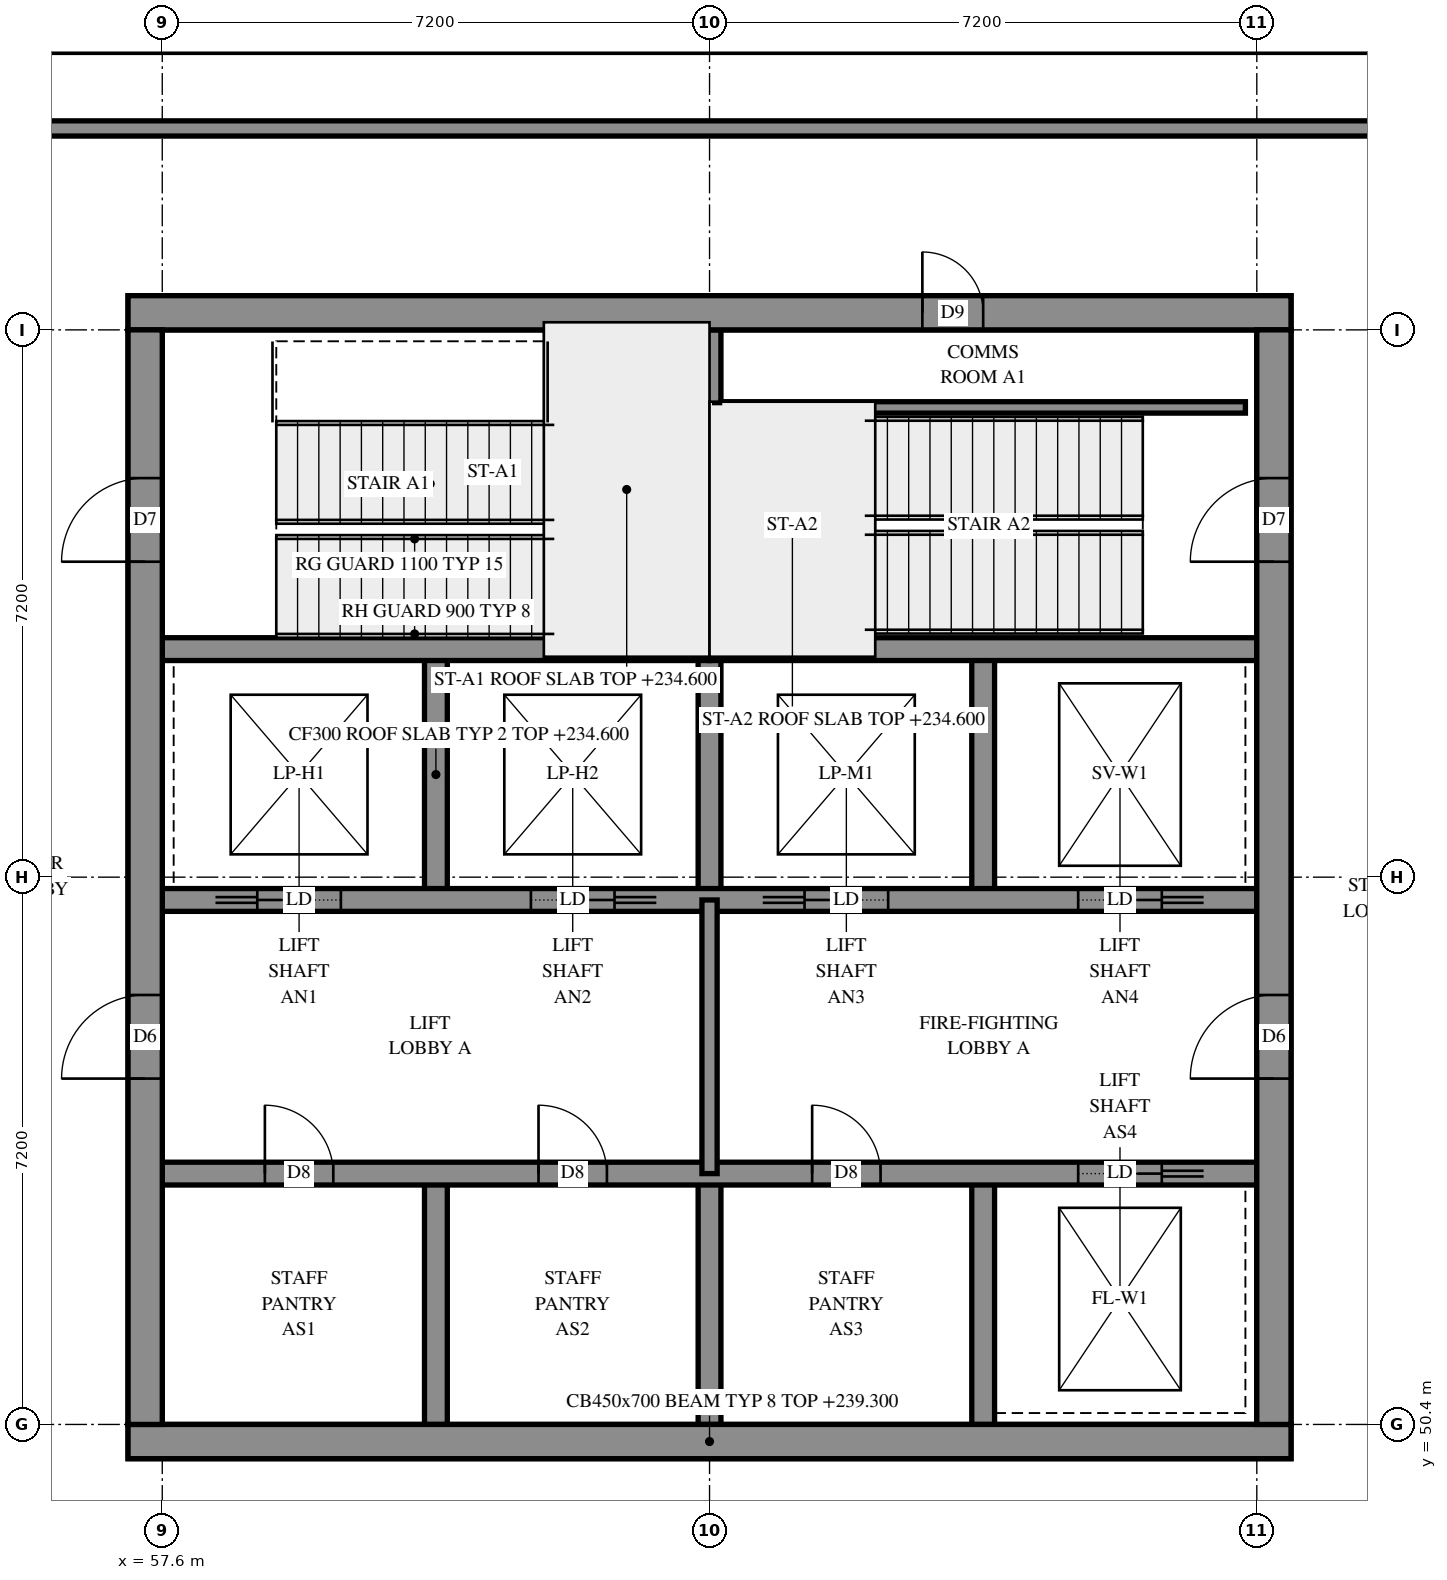
"""IFC4 building model, lengths in metres.
Left out: names, types, materials, properties, quantities, classifications, styles, units other than length and angle.
Written with IfcOpenShell. Run it as: python <this file> out.ifc"""

import sys

from ifc_helpers import new_model, si_unit, direction, frame, frame_2d, origin, place, context, subcontext, project, spatial, polyline, rectangle, outline, extrude, element, fill, save


model = new_model("IFC4")
c1 = context("Model", 3, precision=1e-05, world=origin(), true_north=direction((0.0, 1.0)))
c2 = subcontext(c1, "Body", "Model", "MODEL_VIEW")
j1 = project(units=[si_unit("LENGTHUNIT", "METRE"), si_unit("PLANEANGLEUNIT", "RADIAN")], contexts=[c1])
p1 = place(None, origin())
s1 = spatial("IfcSite", under=j1, at=p1, CompositionType="ELEMENT")
p2 = place(p1, origin())
s2 = spatial("IfcBuilding", under=s1, at=p2, CompositionType="ELEMENT")
p3 = place(p2, frame((0.0, 0.0, 234.6)))
s3 = spatial("IfcBuildingStorey", under=s2, at=p3, CompositionType="ELEMENT", Elevation=234.6)
p4 = place(p3, frame((57.15, 50.175, -0.3), z_axis=(0.0, 0.0, 1.0), x_axis=(1.0, 0.0, 0.0)))
e1 = element("IfcWall", 1, at=p4, inside=s3, PredefinedType="SHEAR", context=c2, shape_type="SweptSolid", body=[
    extrude(rectangle(XDim=15.3, YDim=0.45, at=frame_2d((7.65, 0.0))), origin(), (0.0, 0.0, 1.0), 4.3),
])
p5 = place(p3, frame((57.15, 65.025, -0.3), z_axis=(0.0, 0.0, 1.0), x_axis=(1.0, 0.0, 0.0)))
e2 = element("IfcWall", 2, at=p5, inside=s3, PredefinedType="SHEAR", context=c2, shape_type="SweptSolid", body=[
    extrude(rectangle(XDim=15.3, YDim=0.45, at=frame_2d((7.65, 0.0))), origin(), (0.0, 0.0, 1.0), 4.3),
])
p6 = place(p5, frame((10.45, 0.0, 0.3)))
e3 = element("IfcOpeningElement", 3, at=p6, cuts=e2, PredefinedType="OPENING", context=c2, shape_type="SweptSolid", body=[
    extrude(rectangle(XDim=0.8, YDim=2.1, at=frame_2d((0.4, 1.05))), frame((0.0, 0.235, 0.0), z_axis=(0.0, -1.0, 0.0), x_axis=(1.0, 0.0, 0.0)), (0.0, 0.0, 1.0), 0.47),
])
p7 = place(p3, frame((57.375, 50.4, -0.3), z_axis=(0.0, 0.0, 1.0), x_axis=(0.0, 1.0, 0.0)))
e4 = element("IfcWall", 4, at=p7, inside=s3, PredefinedType="SHEAR", context=c2, shape_type="SweptSolid", body=[
    extrude(rectangle(XDim=14.4, YDim=0.45, at=frame_2d((7.2, 0.0))), origin(), (0.0, 0.0, 1.0), 4.3),
])
p8 = place(p7, frame((4.55, 0.0, 0.3)))
e5 = element("IfcOpeningElement", 5, at=p8, cuts=e4, PredefinedType="OPENING", context=c2, shape_type="SweptSolid", body=[
    extrude(rectangle(XDim=1.1, YDim=2.1, at=frame_2d((0.55, 1.05))), frame((0.0, 0.235, 0.0), z_axis=(0.0, -1.0, 0.0), x_axis=(1.0, 0.0, 0.0)), (0.0, 0.0, 1.0), 0.47),
])
p9 = place(p7, frame((11.35, 0.0, 0.3)))
e6 = element("IfcOpeningElement", 6, at=p9, cuts=e4, PredefinedType="OPENING", context=c2, shape_type="SweptSolid", body=[
    extrude(rectangle(XDim=1.1, YDim=2.1, at=frame_2d((0.55, 1.05))), frame((0.0, 0.235, 0.0), z_axis=(0.0, -1.0, 0.0), x_axis=(1.0, 0.0, 0.0)), (0.0, 0.0, 1.0), 0.47),
])
p10 = place(p3, frame((72.225, 50.4, -0.3), z_axis=(0.0, 0.0, 1.0), x_axis=(0.0, 1.0, 0.0)))
e7 = element("IfcWall", 7, at=p10, inside=s3, PredefinedType="SHEAR", context=c2, shape_type="SweptSolid", body=[
    extrude(rectangle(XDim=14.4, YDim=0.45, at=frame_2d((7.2, 0.0))), origin(), (0.0, 0.0, 1.0), 4.3),
])
p11 = place(p10, frame((4.55, 0.0, 0.3)))
e8 = element("IfcOpeningElement", 8, at=p11, cuts=e7, PredefinedType="OPENING", context=c2, shape_type="SweptSolid", body=[
    extrude(rectangle(XDim=1.1, YDim=2.1, at=frame_2d((0.55, 1.05))), frame((0.0, 0.235, 0.0), z_axis=(0.0, -1.0, 0.0), x_axis=(1.0, 0.0, 0.0)), (0.0, 0.0, 1.0), 0.47),
])
p12 = place(p10, frame((11.35, 0.0, 0.3)))
e9 = element("IfcOpeningElement", 9, at=p12, cuts=e7, PredefinedType="OPENING", context=c2, shape_type="SweptSolid", body=[
    extrude(rectangle(XDim=1.1, YDim=2.1, at=frame_2d((0.55, 1.05))), frame((0.0, 0.235, 0.0), z_axis=(0.0, -1.0, 0.0), x_axis=(1.0, 0.0, 0.0)), (0.0, 0.0, 1.0), 0.47),
])
for number, where, z_axis, x_axis in (
    (10, (61.2, 50.4, 0.0), (0.0, 0.0, 1.0), (0.0, 1.0, 0.0)),
    (11, (61.2, 57.3, 0.0), (0.0, 0.0, 1.0), (0.0, 1.0, 0.0)),
    (12, (64.8, 50.4, 0.0), (0.0, 0.0, 1.0), (0.0, 1.0, 0.0)),
    (13, (64.8, 57.3, 0.0), (0.0, 0.0, 1.0), (0.0, 1.0, 0.0)),
    (14, (68.4, 50.4, 0.0), (0.0, 0.0, 1.0), (0.0, 1.0, 0.0)),
    (15, (68.4, 57.3, 0.0), (0.0, 0.0, 1.0), (0.0, 1.0, 0.0)),
):
    element("IfcWall", number, at=place(p3, frame(where, z_axis=z_axis, x_axis=x_axis)), inside=s3, PredefinedType="SOLIDWALL", context=c2, shape_type="SweptSolid", body=[
        extrude(rectangle(XDim=3.3, YDim=0.3, at=frame_2d((1.65, 0.0))), origin(), (0.0, 0.0, 1.0), 4.7),
    ])
p13 = place(p3, frame((57.6, 53.7, 0.0), z_axis=(0.0, 0.0, 1.0), x_axis=(1.0, 0.0, 0.0)))
e16 = element("IfcWall", 16, at=p13, inside=s3, PredefinedType="SOLIDWALL", context=c2, shape_type="SweptSolid", body=[
    extrude(rectangle(XDim=14.4, YDim=0.3, at=frame_2d((7.2, 0.0))), origin(), (0.0, 0.0, 1.0), 4.7),
])
p14 = place(p13, frame((1.35, 0.0, 0.0)))
e17 = element("IfcOpeningElement", 17, at=p14, cuts=e16, PredefinedType="OPENING", context=c2, shape_type="SweptSolid", body=[
    extrude(rectangle(XDim=0.9, YDim=2.1, at=frame_2d((0.45, 1.05))), frame((0.0, 0.16, 0.0), z_axis=(0.0, -1.0, 0.0), x_axis=(1.0, 0.0, 0.0)), (0.0, 0.0, 1.0), 0.32),
])
p15 = place(p13, frame((4.95, 0.0, 0.0)))
e18 = element("IfcOpeningElement", 18, at=p15, cuts=e16, PredefinedType="OPENING", context=c2, shape_type="SweptSolid", body=[
    extrude(rectangle(XDim=0.9, YDim=2.1, at=frame_2d((0.45, 1.05))), frame((0.0, 0.16, 0.0), z_axis=(0.0, -1.0, 0.0), x_axis=(1.0, 0.0, 0.0)), (0.0, 0.0, 1.0), 0.32),
])
p16 = place(p13, frame((8.55, 0.0, 0.0)))
e19 = element("IfcOpeningElement", 19, at=p16, cuts=e16, PredefinedType="OPENING", context=c2, shape_type="SweptSolid", body=[
    extrude(rectangle(XDim=0.9, YDim=2.1, at=frame_2d((0.45, 1.05))), frame((0.0, 0.16, 0.0), z_axis=(0.0, -1.0, 0.0), x_axis=(1.0, 0.0, 0.0)), (0.0, 0.0, 1.0), 0.32),
])
p17 = place(p13, frame((12.05, 0.0, 0.0)))
e20 = element("IfcOpeningElement", 20, at=p17, cuts=e16, PredefinedType="OPENING", context=c2, shape_type="SweptSolid", body=[
    extrude(rectangle(XDim=1.1, YDim=2.1, at=frame_2d((0.55, 1.05))), frame((0.0, 0.16, 0.0), z_axis=(0.0, -1.0, 0.0), x_axis=(1.0, 0.0, 0.0)), (0.0, 0.0, 1.0), 0.32),
])
p18 = place(p3, frame((57.6, 57.3, 0.0), z_axis=(0.0, 0.0, 1.0), x_axis=(1.0, 0.0, 0.0)))
e21 = element("IfcWall", 21, at=p18, inside=s3, PredefinedType="SOLIDWALL", context=c2, shape_type="SweptSolid", body=[
    extrude(rectangle(XDim=14.4, YDim=0.3, at=frame_2d((7.2, 0.0))), origin(), (0.0, 0.0, 1.0), 4.7),
])
p19 = place(p18, frame((1.25, 0.0, 0.0)))
e22 = element("IfcOpeningElement", 22, at=p19, cuts=e21, PredefinedType="OPENING", context=c2, shape_type="SweptSolid", body=[
    extrude(rectangle(XDim=1.1, YDim=2.1, at=frame_2d((0.55, 1.05))), frame((0.0, 0.16, 0.0), z_axis=(0.0, -1.0, 0.0), x_axis=(1.0, 0.0, 0.0)), (0.0, 0.0, 1.0), 0.32),
])
p20 = place(p18, frame((4.85, 0.0, 0.0)))
e23 = element("IfcOpeningElement", 23, at=p20, cuts=e21, PredefinedType="OPENING", context=c2, shape_type="SweptSolid", body=[
    extrude(rectangle(XDim=1.1, YDim=2.1, at=frame_2d((0.55, 1.05))), frame((0.0, 0.16, 0.0), z_axis=(0.0, -1.0, 0.0), x_axis=(1.0, 0.0, 0.0)), (0.0, 0.0, 1.0), 0.32),
])
p21 = place(p18, frame((8.45, 0.0, 0.0)))
e24 = element("IfcOpeningElement", 24, at=p21, cuts=e21, PredefinedType="OPENING", context=c2, shape_type="SweptSolid", body=[
    extrude(rectangle(XDim=1.1, YDim=2.1, at=frame_2d((0.55, 1.05))), frame((0.0, 0.16, 0.0), z_axis=(0.0, -1.0, 0.0), x_axis=(1.0, 0.0, 0.0)), (0.0, 0.0, 1.0), 0.32),
])
p22 = place(p18, frame((12.05, 0.0, 0.0)))
e25 = element("IfcOpeningElement", 25, at=p22, cuts=e21, PredefinedType="OPENING", context=c2, shape_type="SweptSolid", body=[
    extrude(rectangle(XDim=1.1, YDim=2.1, at=frame_2d((0.55, 1.05))), frame((0.0, 0.16, 0.0), z_axis=(0.0, -1.0, 0.0), x_axis=(1.0, 0.0, 0.0)), (0.0, 0.0, 1.0), 0.32),
])
for number, where, z_axis, x_axis in (
    (26, (57.6, 60.6, 0.0), (0.0, 0.0, 1.0), (1.0, 0.0, 0.0)),
    (27, (64.8, 60.6, 0.0), (0.0, 0.0, 1.0), (1.0, 0.0, 0.0)),
):
    element("IfcWall", number, at=place(p3, frame(where, z_axis=z_axis, x_axis=x_axis)), inside=s3, PredefinedType="SOLIDWALL", context=c2, shape_type="SweptSolid", body=[
        extrude(rectangle(XDim=7.2, YDim=0.3, at=frame_2d((3.6, 0.0))), origin(), (0.0, 0.0, 1.0), 4.7),
    ])
p23 = place(p3, frame((64.8, 60.6, 0.0), z_axis=(0.0, 0.0, 1.0), x_axis=(0.0, 1.0, 0.0)))
e28 = element("IfcWall", 28, at=p23, inside=s3, PredefinedType="SOLIDWALL", context=c2, shape_type="SweptSolid", body=[
    extrude(rectangle(XDim=4.2, YDim=0.3, at=frame_2d((2.1, 0.0))), origin(), (0.0, 0.0, 1.0), 4.7),
])
p24 = place(p3, frame((77.844, 68.725, 0.0), z_axis=(0.0, 0.0, 1.0), x_axis=(-1.0, 0.0, 0.0)))
e29 = element("IfcWall", 29, at=p24, inside=s3, PredefinedType="SOLIDWALL", context=c2, shape_type="SweptSolid", body=[
    extrude(outline(polyline([(-0.114, -0.275), (46.044, -0.275), (45.493, 0.275), (0.114, 0.275), (-0.114, -0.275)])), origin(), (0.0, 0.0, 1.0), 4.7),
])
p25 = place(p24, frame((3.193, 0.0, 0.9)))
e30 = element("IfcOpeningElement", 30, at=p25, cuts=e29, PredefinedType="OPENING", context=c2, shape_type="SweptSolid", body=[
    extrude(rectangle(XDim=1.8, YDim=3.6, at=frame_2d((0.9, 1.8))), frame((0.0, 0.285, 0.0), z_axis=(0.0, -1.0, 0.0), x_axis=(1.0, 0.0, 0.0)), (0.0, 0.0, 1.0), 0.57),
])
p26 = place(p24, frame((6.744, 0.0, 0.9)))
e31 = element("IfcOpeningElement", 31, at=p26, cuts=e29, PredefinedType="OPENING", context=c2, shape_type="SweptSolid", body=[
    extrude(rectangle(XDim=1.8, YDim=3.6, at=frame_2d((0.9, 1.8))), frame((0.0, 0.285, 0.0), z_axis=(0.0, -1.0, 0.0), x_axis=(1.0, 0.0, 0.0)), (0.0, 0.0, 1.0), 0.57),
])
p27 = place(p24, frame((10.344, 0.0, 0.9)))
e32 = element("IfcOpeningElement", 32, at=p27, cuts=e29, PredefinedType="OPENING", context=c2, shape_type="SweptSolid", body=[
    extrude(rectangle(XDim=1.8, YDim=3.6, at=frame_2d((0.9, 1.8))), frame((0.0, 0.285, 0.0), z_axis=(0.0, -1.0, 0.0), x_axis=(1.0, 0.0, 0.0)), (0.0, 0.0, 1.0), 0.57),
])
p28 = place(p24, frame((13.944, 0.0, 0.9)))
e33 = element("IfcOpeningElement", 33, at=p28, cuts=e29, PredefinedType="OPENING", context=c2, shape_type="SweptSolid", body=[
    extrude(rectangle(XDim=1.8, YDim=3.6, at=frame_2d((0.9, 1.8))), frame((0.0, 0.285, 0.0), z_axis=(0.0, -1.0, 0.0), x_axis=(1.0, 0.0, 0.0)), (0.0, 0.0, 1.0), 0.57),
])
p29 = place(p24, frame((17.544, 0.0, 0.9)))
e34 = element("IfcOpeningElement", 34, at=p29, cuts=e29, PredefinedType="OPENING", context=c2, shape_type="SweptSolid", body=[
    extrude(rectangle(XDim=1.8, YDim=3.6, at=frame_2d((0.9, 1.8))), frame((0.0, 0.285, 0.0), z_axis=(0.0, -1.0, 0.0), x_axis=(1.0, 0.0, 0.0)), (0.0, 0.0, 1.0), 0.57),
])
p30 = place(p24, frame((21.143, 0.0, 0.9)))
e35 = element("IfcOpeningElement", 35, at=p30, cuts=e29, PredefinedType="OPENING", context=c2, shape_type="SweptSolid", body=[
    extrude(rectangle(XDim=1.8, YDim=3.6, at=frame_2d((0.9, 1.8))), frame((0.0, 0.285, 0.0), z_axis=(0.0, -1.0, 0.0), x_axis=(1.0, 0.0, 0.0)), (0.0, 0.0, 1.0), 0.57),
])
p31 = place(p24, frame((24.744, 0.0, 0.9)))
e36 = element("IfcOpeningElement", 36, at=p31, cuts=e29, PredefinedType="OPENING", context=c2, shape_type="SweptSolid", body=[
    extrude(rectangle(XDim=1.8, YDim=3.6, at=frame_2d((0.9, 1.8))), frame((0.0, 0.285, 0.0), z_axis=(0.0, -1.0, 0.0), x_axis=(1.0, 0.0, 0.0)), (0.0, 0.0, 1.0), 0.57),
])
p32 = place(p24, frame((28.343, 0.0, 0.9)))
e37 = element("IfcOpeningElement", 37, at=p32, cuts=e29, PredefinedType="OPENING", context=c2, shape_type="SweptSolid", body=[
    extrude(rectangle(XDim=1.8, YDim=3.6, at=frame_2d((0.9, 1.8))), frame((0.0, 0.285, 0.0), z_axis=(0.0, -1.0, 0.0), x_axis=(1.0, 0.0, 0.0)), (0.0, 0.0, 1.0), 0.57),
])
p33 = place(p24, frame((31.944, 0.0, 0.9)))
e38 = element("IfcOpeningElement", 38, at=p33, cuts=e29, PredefinedType="OPENING", context=c2, shape_type="SweptSolid", body=[
    extrude(rectangle(XDim=1.8, YDim=3.6, at=frame_2d((0.9, 1.8))), frame((0.0, 0.285, 0.0), z_axis=(0.0, -1.0, 0.0), x_axis=(1.0, 0.0, 0.0)), (0.0, 0.0, 1.0), 0.57),
])
p34 = place(p24, frame((35.544, 0.0, 0.9)))
e39 = element("IfcOpeningElement", 39, at=p34, cuts=e29, PredefinedType="OPENING", context=c2, shape_type="SweptSolid", body=[
    extrude(rectangle(XDim=1.8, YDim=3.6, at=frame_2d((0.9, 1.8))), frame((0.0, 0.285, 0.0), z_axis=(0.0, -1.0, 0.0), x_axis=(1.0, 0.0, 0.0)), (0.0, 0.0, 1.0), 0.57),
])
p35 = place(p3, frame((64.95, 63.78, 0.0), z_axis=(0.0, 0.0, 1.0), x_axis=(1.0, 0.0, 0.0)))
e40 = element("IfcWall", 40, at=p35, inside=s3, PredefinedType="PARTITIONING", context=c2, shape_type="SweptSolid", body=[
    extrude(rectangle(XDim=6.9, YDim=0.15, at=frame_2d((3.45, 0.0))), origin(), (0.0, 0.0, 1.0), 4.7),
])
p36 = place(p3, frame((64.8, 53.7, 0.0), z_axis=(0.0, 0.0, 1.0), x_axis=(0.0, 1.0, 0.0)))
e41 = element("IfcWall", 41, at=p36, inside=s3, PredefinedType="PARTITIONING", context=c2, shape_type="SweptSolid", body=[
    extrude(rectangle(XDim=3.6, YDim=0.2, at=frame_2d((1.8, 0.0))), origin(), (0.0, 0.0, 1.0), 4.7),
])
p37 = place(p3, frame((54.95, 67.45, 0.0), z_axis=(0.0, 0.0, 1.0), x_axis=(1.0, 0.0, 0.0)))
e42 = element("IfcWall", 42, at=p37, inside=s3, PredefinedType="PARTITIONING", context=c2, shape_type="SweptSolid", body=[
    extrude(rectangle(XDim=19.7, YDim=0.2, at=frame_2d((9.85, 0.0))), origin(), (0.0, 0.0, 1.0), 4.7),
])
p38 = place(p6, origin())
e43 = element("IfcDoor", 43, at=p38, inside=s3, OperationType="SINGLE_SWING_RIGHT", PredefinedType="DOOR", context=c2, shape_type="SweptSolid", body=[
    extrude(rectangle(XDim=0.8, YDim=2.1, at=frame_2d((0.4, 1.05))), frame((0.0, 0.025, 0.0), z_axis=(0.0, -1.0, 0.0), x_axis=(1.0, 0.0, 0.0)), (0.0, 0.0, 1.0), 0.05),
])
fill(e3, e43)
p39 = place(p8, origin())
e44 = element("IfcDoor", 44, at=p39, inside=s3, OperationType="DOUBLE_DOOR_SINGLE_SWING", PredefinedType="DOOR", context=c2, shape_type="SweptSolid", body=[
    extrude(rectangle(XDim=1.1, YDim=2.1, at=frame_2d((0.55, 1.05))), frame((0.0, 0.025, 0.0), z_axis=(0.0, -1.0, 0.0), x_axis=(1.0, 0.0, 0.0)), (0.0, 0.0, 1.0), 0.05),
])
fill(e5, e44)
p40 = place(p11, origin())
e45 = element("IfcDoor", 45, at=p40, inside=s3, OperationType="DOUBLE_DOOR_SINGLE_SWING", PredefinedType="DOOR", context=c2, shape_type="SweptSolid", body=[
    extrude(rectangle(XDim=1.1, YDim=2.1, at=frame_2d((0.55, 1.05))), frame((0.0, 0.025, 0.0), z_axis=(0.0, -1.0, 0.0), x_axis=(1.0, 0.0, 0.0)), (0.0, 0.0, 1.0), 0.05),
])
fill(e8, e45)
p41 = place(p9, origin())
e46 = element("IfcDoor", 46, at=p41, inside=s3, OperationType="SINGLE_SWING_LEFT", PredefinedType="DOOR", context=c2, shape_type="SweptSolid", body=[
    extrude(rectangle(XDim=1.1, YDim=2.1, at=frame_2d((0.55, 1.05))), frame((0.0, 0.025, 0.0), z_axis=(0.0, -1.0, 0.0), x_axis=(1.0, 0.0, 0.0)), (0.0, 0.0, 1.0), 0.05),
])
fill(e6, e46)
p42 = place(p12, origin())
e47 = element("IfcDoor", 47, at=p42, inside=s3, OperationType="SINGLE_SWING_RIGHT", PredefinedType="DOOR", context=c2, shape_type="SweptSolid", body=[
    extrude(rectangle(XDim=1.1, YDim=2.1, at=frame_2d((0.55, 1.05))), frame((0.0, 0.025, 0.0), z_axis=(0.0, -1.0, 0.0), x_axis=(1.0, 0.0, 0.0)), (0.0, 0.0, 1.0), 0.05),
])
fill(e9, e47)
p43 = place(p14, origin())
e48 = element("IfcDoor", 48, at=p43, inside=s3, OperationType="SINGLE_SWING_LEFT", PredefinedType="DOOR", context=c2, shape_type="SweptSolid", body=[
    extrude(rectangle(XDim=0.9, YDim=2.1, at=frame_2d((0.45, 1.05))), frame((0.0, 0.025, 0.0), z_axis=(0.0, -1.0, 0.0), x_axis=(1.0, 0.0, 0.0)), (0.0, 0.0, 1.0), 0.05),
])
fill(e17, e48)
p44 = place(p15, origin())
e49 = element("IfcDoor", 49, at=p44, inside=s3, OperationType="SINGLE_SWING_LEFT", PredefinedType="DOOR", context=c2, shape_type="SweptSolid", body=[
    extrude(rectangle(XDim=0.9, YDim=2.1, at=frame_2d((0.45, 1.05))), frame((0.0, 0.025, 0.0), z_axis=(0.0, -1.0, 0.0), x_axis=(1.0, 0.0, 0.0)), (0.0, 0.0, 1.0), 0.05),
])
fill(e18, e49)
p45 = place(p16, origin())
e50 = element("IfcDoor", 50, at=p45, inside=s3, OperationType="SINGLE_SWING_LEFT", PredefinedType="DOOR", context=c2, shape_type="SweptSolid", body=[
    extrude(rectangle(XDim=0.9, YDim=2.1, at=frame_2d((0.45, 1.05))), frame((0.0, 0.025, 0.0), z_axis=(0.0, -1.0, 0.0), x_axis=(1.0, 0.0, 0.0)), (0.0, 0.0, 1.0), 0.05),
])
fill(e19, e50)
p46 = place(p17, origin())
e51 = element("IfcDoor", 51, at=p46, inside=s3, OperationType="SLIDING_TO_RIGHT", PredefinedType="DOOR", context=c2, shape_type="SweptSolid", body=[
    extrude(rectangle(XDim=1.1, YDim=2.1, at=frame_2d((0.55, 1.05))), frame((0.0, 0.025, 0.0), z_axis=(0.0, -1.0, 0.0), x_axis=(1.0, 0.0, 0.0)), (0.0, 0.0, 1.0), 0.05),
])
fill(e20, e51)
p47 = place(p19, origin())
e52 = element("IfcDoor", 52, at=p47, inside=s3, OperationType="SLIDING_TO_LEFT", PredefinedType="DOOR", context=c2, shape_type="SweptSolid", body=[
    extrude(rectangle(XDim=1.1, YDim=2.1, at=frame_2d((0.55, 1.05))), frame((0.0, 0.025, 0.0), z_axis=(0.0, -1.0, 0.0), x_axis=(1.0, 0.0, 0.0)), (0.0, 0.0, 1.0), 0.05),
])
fill(e22, e52)
p48 = place(p20, origin())
e53 = element("IfcDoor", 53, at=p48, inside=s3, OperationType="SLIDING_TO_RIGHT", PredefinedType="DOOR", context=c2, shape_type="SweptSolid", body=[
    extrude(rectangle(XDim=1.1, YDim=2.1, at=frame_2d((0.55, 1.05))), frame((0.0, 0.025, 0.0), z_axis=(0.0, -1.0, 0.0), x_axis=(1.0, 0.0, 0.0)), (0.0, 0.0, 1.0), 0.05),
])
fill(e23, e53)
p49 = place(p21, origin())
e54 = element("IfcDoor", 54, at=p49, inside=s3, OperationType="SLIDING_TO_LEFT", PredefinedType="DOOR", context=c2, shape_type="SweptSolid", body=[
    extrude(rectangle(XDim=1.1, YDim=2.1, at=frame_2d((0.55, 1.05))), frame((0.0, 0.025, 0.0), z_axis=(0.0, -1.0, 0.0), x_axis=(1.0, 0.0, 0.0)), (0.0, 0.0, 1.0), 0.05),
])
fill(e24, e54)
p50 = place(p22, origin())
e55 = element("IfcDoor", 55, at=p50, inside=s3, OperationType="SLIDING_TO_RIGHT", PredefinedType="DOOR", context=c2, shape_type="SweptSolid", body=[
    extrude(rectangle(XDim=1.1, YDim=2.1, at=frame_2d((0.55, 1.05))), frame((0.0, 0.025, 0.0), z_axis=(0.0, -1.0, 0.0), x_axis=(1.0, 0.0, 0.0)), (0.0, 0.0, 1.0), 0.05),
])
fill(e25, e55)
save(model, sys.argv[1])
